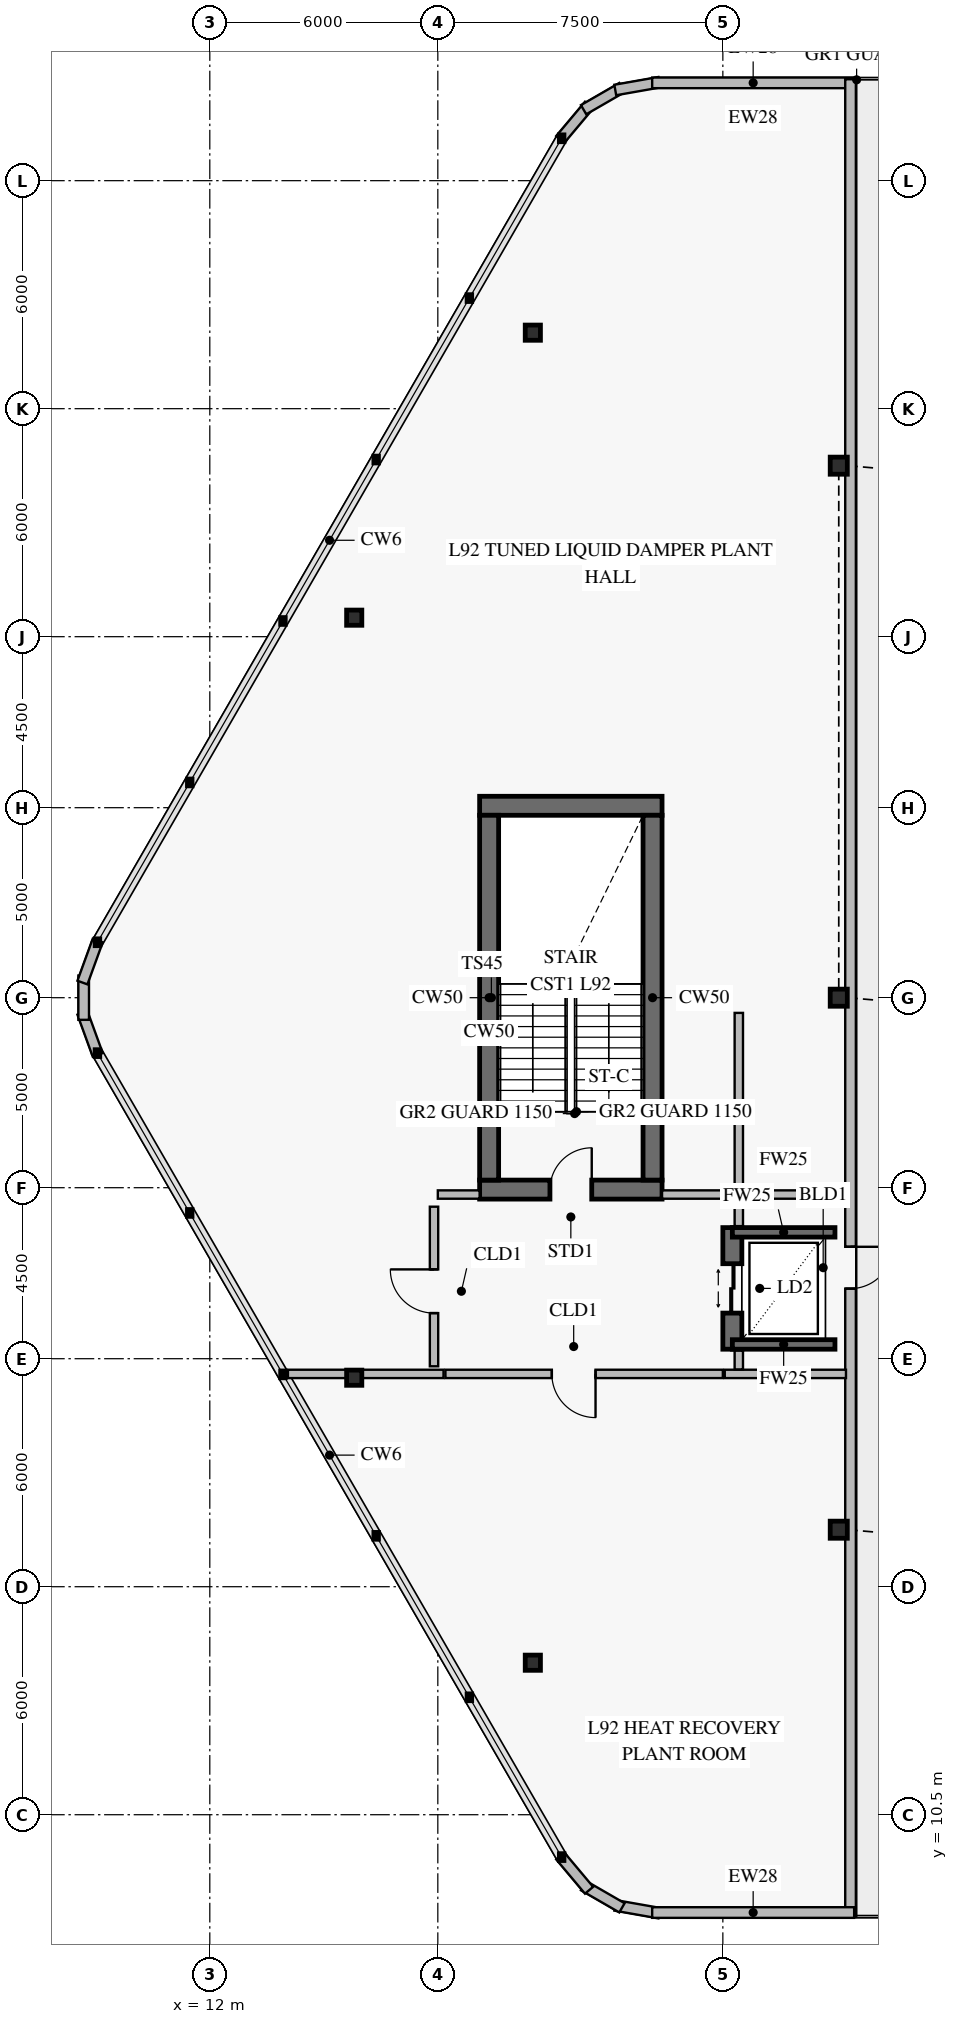
"""IFC4 building model, lengths in metres.
Left out: names, types, materials, properties, quantities, classifications, styles, units other than length and angle.
Written with IfcOpenShell. Run it as: python <this file> out.ifc"""

import sys

from ifc_helpers import new_model, si_unit, direction, frame, frame_2d, origin, origin_2d, place, context, subcontext, project, spatial, rectangle, hollow_rectangle, i_section, extrude, element, fill, save


model = new_model("IFC4")
c1 = context("Model", 3, precision=1e-05, world=origin(), true_north=direction((0.0, 1.0)))
c2 = subcontext(c1, "Body", "Model", "MODEL_VIEW")
j1 = project(units=[si_unit("LENGTHUNIT", "METRE"), si_unit("PLANEANGLEUNIT", "RADIAN")], contexts=[c1])
p1 = place(None, origin())
s1 = spatial("IfcSite", under=j1, at=p1, CompositionType="ELEMENT")
p2 = place(p1, origin())
s2 = spatial("IfcBuilding", under=s1, at=p2, CompositionType="ELEMENT")
p3 = place(p2, frame((0.0, 0.0, 361.4)))
s3 = spatial("IfcBuildingStorey", under=s2, at=p3, CompositionType="ELEMENT", Elevation=361.4)
p4 = place(p3, frame((19.1, 26.95, 0.0), z_axis=(0.0, 0.0, 1.0), x_axis=(1.0, 0.0, 0.0)))
e1 = element("IfcWall", 1, at=p4, inside=s3, PredefinedType="SHEAR", context=c2, shape_type="SweptSolid", body=[
    extrude(rectangle(XDim=4.8, YDim=0.5, at=frame_2d((2.4, 0.0))), origin(), (0.0, 0.0, 1.0), 4.4),
])
p5 = place(p4, frame((1.85, 0.0, 0.0)))
e2 = element("IfcOpeningElement", 2, at=p5, cuts=e1, PredefinedType="OPENING", context=c2, shape_type="SweptSolid", body=[
    extrude(rectangle(XDim=1.1, YDim=2.15, at=frame_2d((0.55, 1.075))), frame((0.0, 0.262, 0.0), z_axis=(0.0, -1.0, 0.0), x_axis=(1.0, 0.0, 0.0)), (0.0, 0.0, 1.0), 0.524),
])
p6 = place(p3, frame((23.9, 37.05, 0.0), z_axis=(0.0, 0.0, 1.0), x_axis=(-1.0, 0.0, 0.0)))
e3 = element("IfcWall", 3, at=p6, inside=s3, PredefinedType="SHEAR", context=c2, shape_type="SweptSolid", body=[
    extrude(rectangle(XDim=4.8, YDim=0.5, at=frame_2d((2.4, 0.0))), origin(), (0.0, 0.0, 1.0), 4.4),
])
for number, where, z_axis, x_axis in (
    (4, (19.35, 27.2, 0.0), (0.0, 0.0, 1.0), (0.0, 1.0, 0.0)),
    (5, (23.65, 36.8, 0.0), (0.0, 0.0, 1.0), (0.0, -1.0, 0.0)),
):
    element("IfcWall", number, at=place(p3, frame(where, z_axis=z_axis, x_axis=x_axis)), inside=s3, PredefinedType="SHEAR", context=c2, shape_type="SweptSolid", body=[
        extrude(rectangle(XDim=9.6, YDim=0.5, at=frame_2d((4.8, 0.0))), origin(), (0.0, 0.0, 1.0), 4.4),
    ])
p7 = place(p3, frame((25.75, 22.75, 0.0), z_axis=(0.0, 0.0, 1.0), x_axis=(0.0, 1.0, 0.0)))
e6 = element("IfcWall", 6, at=p7, inside=s3, PredefinedType="SHEAR", context=c2, shape_type="SweptSolid", body=[
    extrude(rectangle(XDim=3.2, YDim=0.5, at=frame_2d((1.6, 0.0))), origin(), (0.0, 0.0, 1.0), 4.4),
])
p8 = place(p7, frame((0.95, 0.0, 0.0)))
e7 = element("IfcOpeningElement", 7, at=p8, cuts=e6, PredefinedType="OPENING", context=c2, shape_type="SweptSolid", body=[
    extrude(rectangle(XDim=1.3, YDim=2.3, at=frame_2d((0.65, 1.15))), frame((0.0, 0.262, 0.0), z_axis=(0.0, -1.0, 0.0), x_axis=(1.0, 0.0, 0.0)), (0.0, 0.0, 1.0), 0.524),
])
for number, where, z_axis, x_axis in (
    (8, (15.8, 22.0, 0.0), (0.0, 0.0, 1.0), (1.0, 0.0, 0.0)),
    (9, (15.8, 42.0, 0.0), (0.0, 0.0, 1.0), (1.0, 0.0, 0.0)),
    (10, (20.5, 14.5, 0.0), (0.0, 0.0, 1.0), (1.0, 0.0, 0.0)),
    (11, (20.5, 49.5, 0.0), (0.0, 0.0, 1.0), (1.0, 0.0, 0.0)),
):
    element("IfcColumn", number, at=place(p3, frame(where, z_axis=z_axis, x_axis=x_axis)), inside=s3, PredefinedType="COLUMN", context=c2, shape_type="SweptSolid", body=[
        extrude(i_section(OverallWidth=0.4, OverallDepth=0.4, WebThickness=0.013, FlangeThickness=0.021, at=origin_2d()), origin(), (0.0, 0.0, 1.0), 4.05),
    ])
for number, where, z_axis, x_axis in (
    (12, (28.55, 18.0, 0.0), (0.0, 0.0, 1.0), (1.0, 0.0, 0.0)),
    (13, (28.55, 32.0, 0.0), (0.0, 0.0, 1.0), (1.0, 0.0, 0.0)),
    (14, (28.55, 46.0, 0.0), (0.0, 0.0, 1.0), (1.0, 0.0, 0.0)),
):
    element("IfcColumn", number, at=place(p3, frame(where, z_axis=z_axis, x_axis=x_axis)), inside=s3, PredefinedType="PILASTER", context=c2, shape_type="SweptSolid", body=[
        extrude(hollow_rectangle(XDim=0.45, YDim=0.45, WallThickness=0.022, at=origin_2d()), origin(), (0.0, 0.0, 1.0), 4.05),
    ])
p9 = place(p3, frame((23.829, 7.909, 0.0), z_axis=(0.0, 0.0, 1.0), x_axis=(-0.984798162481, 0.173702559495, 0.0)))
e15 = element("IfcWall", 15, at=p9, inside=s3, PredefinedType="SOLIDWALL", context=c2, shape_type="SweptSolid", body=[
    extrude(rectangle(XDim=1.178, YDim=0.28, at=frame_2d((0.589, 0.0))), origin(), (0.0, 0.0, 1.0), 4.05),
])
p10 = place(p3, frame((22.845, 8.05, 0.0), z_axis=(0.0, 0.0, 1.0), x_axis=(-0.865951785477, 0.500127488975, 0.0)))
e16 = element("IfcWall", 16, at=p10, inside=s3, PredefinedType="SOLIDWALL", context=c2, shape_type="SweptSolid", body=[
    extrude(rectangle(XDim=1.165, YDim=0.28, at=frame_2d((0.583, 0.0))), origin(), (0.0, 0.0, 1.0), 4.05),
])
for number, where, z_axis, x_axis in (
    (17, (21.979, 8.512, 0.0), (0.0, 0.0, 1.0), (-0.643, 0.766, 0.0)),
    (18, (9.052, 30.495, 0.0), (0.0, 0.0, 1.0), (-0.342, 0.94, 0.0)),
):
    element("IfcWall", number, at=place(p3, frame(where, z_axis=z_axis, x_axis=x_axis)), inside=s3, PredefinedType="SOLIDWALL", context=c2, shape_type="SweptSolid", body=[
        extrude(rectangle(XDim=1.178, YDim=0.28, at=frame_2d((0.589, 0.0))), origin(), (0.0, 0.0, 1.0), 4.05),
    ])
p11 = place(p3, frame((8.681, 31.417, 0.0), z_axis=(0.0, 0.0, 1.0), x_axis=(0.0, 1.0, 0.0)))
e19 = element("IfcWall", 19, at=p11, inside=s3, PredefinedType="SOLIDWALL", context=c2, shape_type="SweptSolid", body=[
    extrude(rectangle(XDim=1.165, YDim=0.28, at=frame_2d((0.583, 0.0))), origin(), (0.0, 0.0, 1.0), 4.05),
])
for number, where, z_axis, x_axis in (
    (20, (8.649, 32.398, 0.0), (0.0, 0.0, 1.0), (0.342, 0.94, 0.0)),
    (21, (21.222, 54.586, 0.0), (0.0, 0.0, 1.0), (0.643, 0.766, 0.0)),
):
    element("IfcWall", number, at=place(p3, frame(where, z_axis=z_axis, x_axis=x_axis)), inside=s3, PredefinedType="SOLIDWALL", context=c2, shape_type="SweptSolid", body=[
        extrude(rectangle(XDim=1.178, YDim=0.28, at=frame_2d((0.589, 0.0))), origin(), (0.0, 0.0, 1.0), 4.05),
    ])
p12 = place(p3, frame((21.836, 55.367, 0.0), z_axis=(0.0, 0.0, 1.0), x_axis=(0.865951785477, 0.500127488975, 0.0)))
e22 = element("IfcWall", 22, at=p12, inside=s3, PredefinedType="SOLIDWALL", context=c2, shape_type="SweptSolid", body=[
    extrude(rectangle(XDim=1.165, YDim=0.28, at=frame_2d((0.583, 0.0))), origin(), (0.0, 0.0, 1.0), 4.05),
])
p13 = place(p3, frame((22.669, 55.886, 0.0), z_axis=(0.0, 0.0, 1.0), x_axis=(0.984798162481, 0.173702559495, 0.0)))
e23 = element("IfcWall", 23, at=p13, inside=s3, PredefinedType="SOLIDWALL", context=c2, shape_type="SweptSolid", body=[
    extrude(rectangle(XDim=1.178, YDim=0.28, at=frame_2d((0.589, 0.0))), origin(), (0.0, 0.0, 1.0), 4.05),
])
p14 = place(p3, frame((23.64, 56.074, 0.0), z_axis=(0.0, 0.0, 1.0), x_axis=(1.0, 0.0, 0.0)))
e24 = element("IfcWall", 24, at=p14, inside=s3, PredefinedType="SOLIDWALL", context=c2, shape_type="SweptSolid", body=[
    extrude(rectangle(XDim=5.315, YDim=0.28, at=frame_2d((2.657, 0.0))), origin(), (0.0, 0.0, 1.0), 4.05),
])
p15 = place(p3, frame((28.86, 56.169, 0.0), z_axis=(0.0, 0.0, 1.0), x_axis=(0.0, -1.0, 0.0)))
e25 = element("IfcWall", 25, at=p15, inside=s3, PredefinedType="SOLIDWALL", context=c2, shape_type="SweptSolid", body=[
    extrude(rectangle(XDim=48.338, YDim=0.28, at=frame_2d((24.169, 0.0))), origin(), (0.0, 0.0, 1.0), 3.465),
])
p16 = place(p15, frame((30.724, 0.0, 0.0)))
e26 = element("IfcOpeningElement", 26, at=p16, cuts=e25, PredefinedType="OPENING", context=c2, shape_type="SweptSolid", body=[
    extrude(rectangle(XDim=1.1, YDim=2.2, at=frame_2d((0.55, 1.1))), frame((0.0, 0.152, 0.0), z_axis=(0.0, -1.0, 0.0), x_axis=(1.0, 0.0, 0.0)), (0.0, 0.0, 1.0), 0.304),
])
p17 = place(p3, frame((28.955, 7.926, 0.0), z_axis=(0.0, 0.0, 1.0), x_axis=(-1.0, 0.0, 0.0)))
e27 = element("IfcWall", 27, at=p17, inside=s3, PredefinedType="SOLIDWALL", context=c2, shape_type="SweptSolid", body=[
    extrude(rectangle(XDim=5.315, YDim=0.28, at=frame_2d((2.657, 0.0))), origin(), (0.0, 0.0, 1.0), 4.05),
])
for number, where, z_axis, x_axis in (
    (28, (25.75, 25.825, 0.0), (0.0, 0.0, 1.0), (1.0, 0.0, 0.0)),
    (29, (25.75, 22.875, 0.0), (0.0, 0.0, 1.0), (1.0, 0.0, 0.0)),
):
    element("IfcWall", number, at=place(p3, frame(where, z_axis=z_axis, x_axis=x_axis)), inside=s3, PredefinedType="SOLIDWALL", context=c2, shape_type="SweptSolid", body=[
        extrude(rectangle(XDim=2.7, YDim=0.25, at=frame_2d((1.35, 0.0))), origin(), (0.0, 0.0, 1.0), 4.4),
    ])
p18 = place(p3, frame((18.2, 22.1, 0.0), z_axis=(0.0, 0.0, 1.0), x_axis=(1.0, 0.0, 0.0)))
e30 = element("IfcWall", 30, at=p18, inside=s3, PredefinedType="PARTITIONING", context=c2, shape_type="SweptSolid", body=[
    extrude(rectangle(XDim=7.3, YDim=0.22, at=frame_2d((3.65, 0.0))), origin(), (0.0, 0.0, 1.0), 4.05),
])
p19 = place(p18, frame((2.8, 0.0, 0.0)))
e31 = element("IfcOpeningElement", 31, at=p19, cuts=e30, PredefinedType="OPENING", context=c2, shape_type="SweptSolid", body=[
    extrude(rectangle(XDim=1.15, YDim=2.2, at=frame_2d((0.575, 1.1))), frame((0.0, 0.122, 0.0), z_axis=(0.0, -1.0, 0.0), x_axis=(1.0, 0.0, 0.0)), (0.0, 0.0, 1.0), 0.244),
])
p20 = place(p3, frame((17.9, 22.3, 0.0), z_axis=(0.0, 0.0, 1.0), x_axis=(0.0, 1.0, 0.0)))
e32 = element("IfcWall", 32, at=p20, inside=s3, PredefinedType="PARTITIONING", context=c2, shape_type="SweptSolid", body=[
    extrude(rectangle(XDim=4.2, YDim=0.22, at=frame_2d((2.1, 0.0))), origin(), (0.0, 0.0, 1.0), 4.05),
])
p21 = place(p20, frame((1.4, 0.0, 0.0)))
e33 = element("IfcOpeningElement", 33, at=p21, cuts=e32, PredefinedType="OPENING", context=c2, shape_type="SweptSolid", body=[
    extrude(rectangle(XDim=1.15, YDim=2.2, at=frame_2d((0.575, 1.1))), frame((0.0, 0.122, 0.0), z_axis=(0.0, -1.0, 0.0), x_axis=(1.0, 0.0, 0.0)), (0.0, 0.0, 1.0), 0.244),
])
p22 = place(p3, frame((14.056, 22.1, 0.0), z_axis=(0.0, 0.0, 1.0), x_axis=(1.0, 0.0, 0.0)))
e34 = element("IfcWall", 34, at=p22, inside=s3, PredefinedType="PARTITIONING", context=c2, shape_type="SweptSolid", body=[
    extrude(rectangle(XDim=4.094, YDim=0.22, at=frame_2d((2.047, 0.0))), origin(), (0.0, 0.0, 1.0), 3.47),
])
p23 = place(p3, frame((25.55, 22.1, 0.0), z_axis=(0.0, 0.0, 1.0), x_axis=(1.0, 0.0, 0.0)))
e35 = element("IfcWall", 35, at=p23, inside=s3, PredefinedType="PARTITIONING", context=c2, shape_type="SweptSolid", body=[
    extrude(rectangle(XDim=3.19, YDim=0.22, at=frame_2d((1.595, 0.0))), origin(), (0.0, 0.0, 1.0), 3.47),
])
p24 = place(p3, frame((28.74, 26.82, 0.0), z_axis=(0.0, 0.0, 1.0), x_axis=(-1.0, 0.0, 0.0)))
e36 = element("IfcWall", 36, at=p24, inside=s3, PredefinedType="PARTITIONING", context=c2, shape_type="SweptSolid", body=[
    extrude(rectangle(XDim=4.84, YDim=0.22, at=frame_2d((2.42, 0.0))), origin(), (0.0, 0.0, 1.0), 3.47),
])
p25 = place(p3, frame((19.1, 26.82, 0.0), z_axis=(0.0, 0.0, 1.0), x_axis=(-1.0, 0.0, 0.0)))
e37 = element("IfcWall", 37, at=p25, inside=s3, PredefinedType="PARTITIONING", context=c2, shape_type="SweptSolid", body=[
    extrude(rectangle(XDim=1.1, YDim=0.22, at=frame_2d((0.55, 0.0))), origin(), (0.0, 0.0, 1.0), 4.05),
])
p26 = place(p3, frame((25.92, 25.989, 0.0), z_axis=(0.0, 0.0, 1.0), x_axis=(0.0, 1.0, 0.0)))
e38 = element("IfcWall", 38, at=p26, inside=s3, PredefinedType="PARTITIONING", context=c2, shape_type="SweptSolid", body=[
    extrude(rectangle(XDim=0.713, YDim=0.22, at=frame_2d((0.356, 0.0))), origin(), (0.0, 0.0, 1.0), 4.05),
])
p27 = place(p3, frame((25.92, 26.938, 0.0), z_axis=(0.0, 0.0, 1.0), x_axis=(0.0, 1.0, 0.0)))
e39 = element("IfcWall", 39, at=p27, inside=s3, PredefinedType="PARTITIONING", context=c2, shape_type="SweptSolid", body=[
    extrude(rectangle(XDim=4.662, YDim=0.22, at=frame_2d((2.331, 0.0))), origin(), (0.0, 0.0, 1.0), 4.05),
])
p28 = place(p3, frame((25.92, 22.218, 0.0), z_axis=(0.0, 0.0, 1.0), x_axis=(0.0, 1.0, 0.0)))
e40 = element("IfcWall", 40, at=p28, inside=s3, PredefinedType="PARTITIONING", context=c2, shape_type="SweptSolid", body=[
    extrude(rectangle(XDim=0.493, YDim=0.22, at=frame_2d((0.247, 0.0))), origin(), (0.0, 0.0, 1.0), 4.05),
])
p29 = place(p16, origin())
e41 = element("IfcDoor", 41, at=p29, inside=s3, OperationType="SINGLE_SWING_LEFT", PredefinedType="DOOR", context=c2, shape_type="SweptSolid", body=[
    extrude(rectangle(XDim=1.1, YDim=2.2, at=frame_2d((0.55, 1.1))), frame((0.0, 0.025, 0.0), z_axis=(0.0, -1.0, 0.0), x_axis=(1.0, 0.0, 0.0)), (0.0, 0.0, 1.0), 0.05),
])
fill(e26, e41)
p30 = place(p8, origin())
e42 = element("IfcDoor", 42, at=p30, inside=s3, OperationType="DOUBLE_DOOR_SLIDING", PredefinedType="DOOR", context=c2, shape_type="SweptSolid", body=[
    extrude(rectangle(XDim=1.3, YDim=2.3, at=frame_2d((0.65, 1.15))), frame((0.0, 0.025, 0.0), z_axis=(0.0, -1.0, 0.0), x_axis=(1.0, 0.0, 0.0)), (0.0, 0.0, 1.0), 0.05),
])
fill(e7, e42)
p31 = place(p5, origin())
e43 = element("IfcDoor", 43, at=p31, inside=s3, OperationType="SINGLE_SWING_RIGHT", PredefinedType="USERDEFINED", context=c2, shape_type="SweptSolid", body=[
    extrude(rectangle(XDim=1.1, YDim=2.15, at=frame_2d((0.55, 1.075))), frame((0.0, 0.025, 0.0), z_axis=(0.0, -1.0, 0.0), x_axis=(1.0, 0.0, 0.0)), (0.0, 0.0, 1.0), 0.05),
])
fill(e2, e43)
p32 = place(p19, frame((1.15, 0.0, 0.0), z_axis=(0.0, 0.0, 1.0), x_axis=(-1.0, 0.0, 0.0)))
e44 = element("IfcDoor", 44, at=p32, inside=s3, OperationType="SINGLE_SWING_LEFT", PredefinedType="DOOR", context=c2, shape_type="SweptSolid", body=[
    extrude(rectangle(XDim=1.15, YDim=2.2, at=frame_2d((0.575, 1.1))), frame((0.0, 0.025, 0.0), z_axis=(0.0, -1.0, 0.0), x_axis=(1.0, 0.0, 0.0)), (0.0, 0.0, 1.0), 0.05),
])
fill(e31, e44)
p33 = place(p21, origin())
e45 = element("IfcDoor", 45, at=p33, inside=s3, OperationType="SINGLE_SWING_RIGHT", PredefinedType="DOOR", context=c2, shape_type="SweptSolid", body=[
    extrude(rectangle(XDim=1.15, YDim=2.2, at=frame_2d((0.575, 1.1))), frame((0.0, 0.025, 0.0), z_axis=(0.0, -1.0, 0.0), x_axis=(1.0, 0.0, 0.0)), (0.0, 0.0, 1.0), 0.05),
])
fill(e33, e45)
save(model, sys.argv[1])
